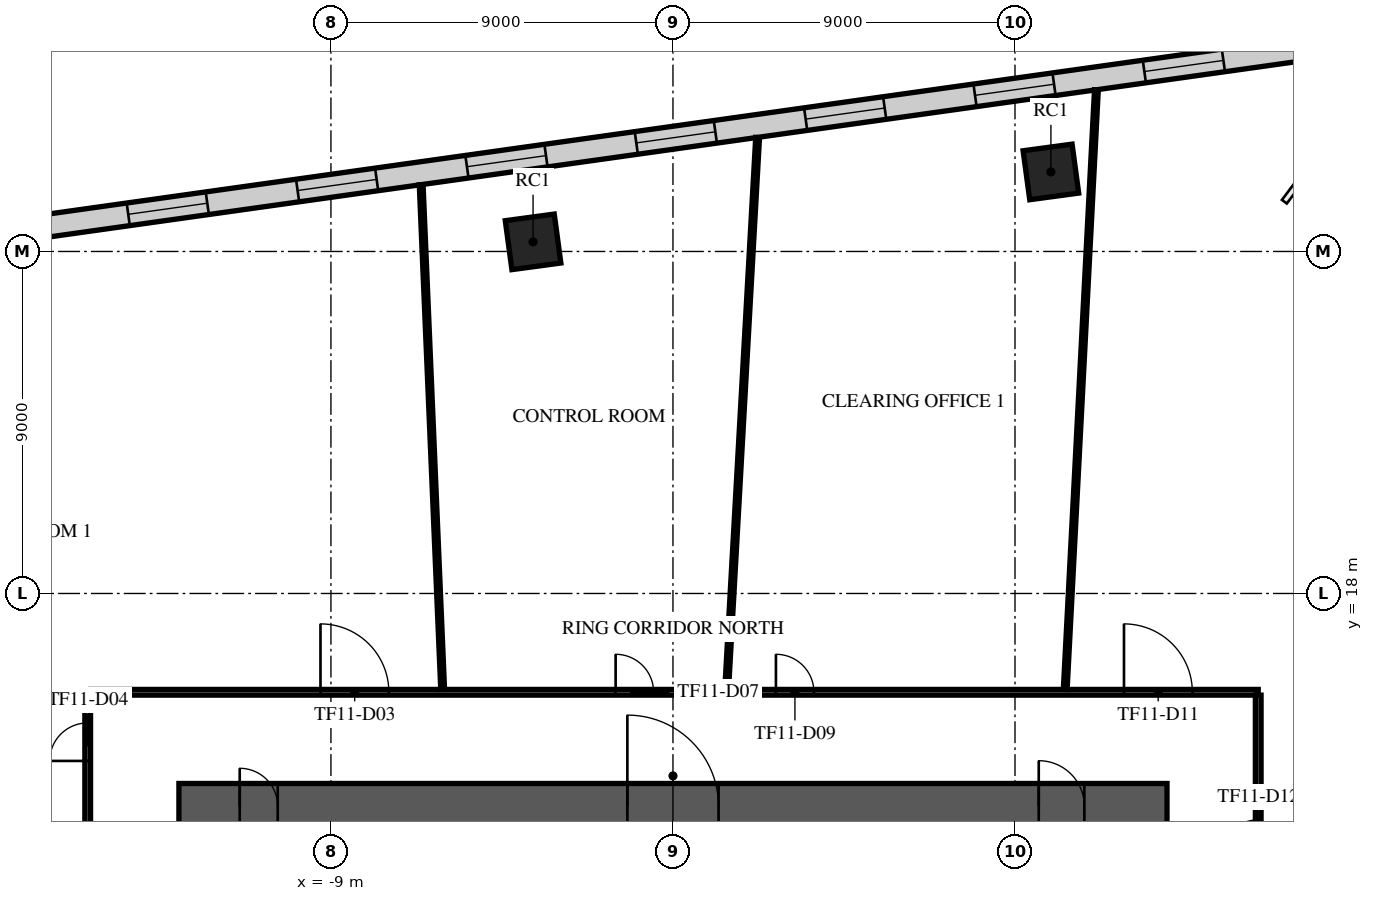
"""IFC4 building model, lengths in metres.
Left out: names, types, materials, properties, quantities, classifications, styles, units other than length and angle.
Written with IfcOpenShell. Run it as: python <this file> out.ifc"""

import sys

from ifc_helpers import new_model, si_unit, direction, frame, frame_2d, origin, origin_2d, place, context, subcontext, project, spatial, rectangle, extrude, element, fill, save


model = new_model("IFC4")
c1 = context("Model", 3, precision=1e-05, world=origin(), true_north=direction((0.0, 1.0)))
c2 = subcontext(c1, "Body", "Model", "MODEL_VIEW")
j1 = project(units=[si_unit("LENGTHUNIT", "METRE"), si_unit("PLANEANGLEUNIT", "RADIAN")], contexts=[c1])
p1 = place(None, origin())
s1 = spatial("IfcSite", under=j1, at=p1, CompositionType="ELEMENT")
p2 = place(p1, origin())
s2 = spatial("IfcBuilding", under=s1, at=p2, CompositionType="ELEMENT")
p3 = place(p2, frame((0.0, 0.0, 51.3)))
s3 = spatial("IfcBuildingStorey", under=s2, at=p3, CompositionType="ELEMENT", Elevation=51.3)
for number, where, z_axis, x_axis in (
    (1, (9.945, 29.093, 0.0), (0.0, 0.0, 1.0), (0.991, 0.134, 0.0)),
    (2, (-3.681, 27.253, 0.0), (0.0, 0.0, 1.0), (0.991, 0.134, 0.0)),
):
    element("IfcColumn", number, at=place(p3, frame(where, z_axis=z_axis, x_axis=x_axis)), inside=s3, PredefinedType="COLUMN", context=c2, shape_type="SweptSolid", body=[
        extrude(rectangle(XDim=1.3, YDim=1.3, at=origin_2d()), origin(), (0.0, 0.0, 1.0), 4.2),
    ])
p4 = place(p3, frame((-13.0, 12.4, 0.0), z_axis=(0.0, 0.0, 1.0), x_axis=(1.0, 0.0, 0.0)))
e3 = element("IfcWall", 3, at=p4, inside=s3, PredefinedType="SHEAR", context=c2, shape_type="SweptSolid", body=[
    extrude(rectangle(XDim=26.0, YDim=1.2, at=frame_2d((13.0, 0.0))), origin(), (0.0, 0.0, 1.0), 3.75),
])
p5 = place(p4, frame((11.8, 0.0, 0.0)))
e4 = element("IfcOpeningElement", 4, at=p5, cuts=e3, PredefinedType="OPENING", context=c2, shape_type="SweptSolid", body=[
    extrude(rectangle(XDim=2.4, YDim=2.4, at=frame_2d((1.2, 1.2))), frame((0.0, 0.61, 0.0), z_axis=(0.0, -1.0, 0.0), x_axis=(1.0, 0.0, 0.0)), (0.0, 0.0, 1.0), 1.22),
])
p6 = place(p4, frame((22.625, 0.0, 0.0)))
e5 = element("IfcOpeningElement", 5, at=p6, cuts=e3, PredefinedType="OPENING", context=c2, shape_type="SweptSolid", body=[
    extrude(rectangle(XDim=1.2, YDim=2.1, at=frame_2d((0.6, 1.05))), frame((0.0, 0.61, 0.0), z_axis=(0.0, -1.0, 0.0), x_axis=(1.0, 0.0, 0.0)), (0.0, 0.0, 1.0), 1.22),
])
p7 = place(p4, frame((1.6, 0.0, 0.0)))
e6 = element("IfcOpeningElement", 6, at=p7, cuts=e3, PredefinedType="OPENING", context=c2, shape_type="SweptSolid", body=[
    extrude(rectangle(XDim=1.0, YDim=2.1, at=frame_2d((0.5, 1.05))), frame((0.0, 0.61, 0.0), z_axis=(0.0, -1.0, 0.0), x_axis=(1.0, 0.0, 0.0)), (0.0, 0.0, 1.0), 1.22),
])
p8 = place(p3, frame((20.128, 32.821, 0.0), z_axis=(0.0, 0.0, 1.0), x_axis=(-0.990267943129, -0.139173994734, 0.0)))
e7 = element("IfcWall", 7, at=p8, inside=s3, PredefinedType="STANDARD", context=c2, shape_type="SweptSolid", body=[
    extrude(rectangle(XDim=49.376, YDim=0.6, at=frame_2d((24.688, 0.0))), origin(), (0.0, 0.0, 1.0), 3.75),
])
p9 = place(p8, frame((1.2, 0.0, 0.9)))
e8 = element("IfcOpeningElement", 8, at=p9, cuts=e7, PredefinedType="OPENING", context=c2, shape_type="SweptSolid", body=[
    extrude(rectangle(XDim=2.1, YDim=2.1, at=frame_2d((1.05, 1.05))), frame((0.0, 0.31, 0.0), z_axis=(0.0, -1.0, 0.0), x_axis=(1.0, 0.0, 0.0)), (0.0, 0.0, 1.0), 0.62),
])
p10 = place(p8, frame((5.7, 0.0, 0.9)))
e9 = element("IfcOpeningElement", 9, at=p10, cuts=e7, PredefinedType="OPENING", context=c2, shape_type="SweptSolid", body=[
    extrude(rectangle(XDim=2.1, YDim=2.1, at=frame_2d((1.05, 1.05))), frame((0.0, 0.31, 0.0), z_axis=(0.0, -1.0, 0.0), x_axis=(1.0, 0.0, 0.0)), (0.0, 0.0, 1.0), 0.62),
])
p11 = place(p8, frame((10.2, 0.0, 0.9)))
e10 = element("IfcOpeningElement", 10, at=p11, cuts=e7, PredefinedType="OPENING", context=c2, shape_type="SweptSolid", body=[
    extrude(rectangle(XDim=2.1, YDim=2.1, at=frame_2d((1.05, 1.05))), frame((0.0, 0.31, 0.0), z_axis=(0.0, -1.0, 0.0), x_axis=(1.0, 0.0, 0.0)), (0.0, 0.0, 1.0), 0.62),
])
p12 = place(p8, frame((14.7, 0.0, 0.9)))
e11 = element("IfcOpeningElement", 11, at=p12, cuts=e7, PredefinedType="OPENING", context=c2, shape_type="SweptSolid", body=[
    extrude(rectangle(XDim=2.1, YDim=2.1, at=frame_2d((1.05, 1.05))), frame((0.0, 0.31, 0.0), z_axis=(0.0, -1.0, 0.0), x_axis=(1.0, 0.0, 0.0)), (0.0, 0.0, 1.0), 0.62),
])
p13 = place(p8, frame((19.2, 0.0, 0.9)))
e12 = element("IfcOpeningElement", 12, at=p13, cuts=e7, PredefinedType="OPENING", context=c2, shape_type="SweptSolid", body=[
    extrude(rectangle(XDim=2.1, YDim=2.1, at=frame_2d((1.05, 1.05))), frame((0.0, 0.31, 0.0), z_axis=(0.0, -1.0, 0.0), x_axis=(1.0, 0.0, 0.0)), (0.0, 0.0, 1.0), 0.62),
])
p14 = place(p8, frame((23.7, 0.0, 0.9)))
e13 = element("IfcOpeningElement", 13, at=p14, cuts=e7, PredefinedType="OPENING", context=c2, shape_type="SweptSolid", body=[
    extrude(rectangle(XDim=2.1, YDim=2.1, at=frame_2d((1.05, 1.05))), frame((0.0, 0.31, 0.0), z_axis=(0.0, -1.0, 0.0), x_axis=(1.0, 0.0, 0.0)), (0.0, 0.0, 1.0), 0.62),
])
p15 = place(p8, frame((28.2, 0.0, 0.9)))
e14 = element("IfcOpeningElement", 14, at=p15, cuts=e7, PredefinedType="OPENING", context=c2, shape_type="SweptSolid", body=[
    extrude(rectangle(XDim=2.1, YDim=2.1, at=frame_2d((1.05, 1.05))), frame((0.0, 0.31, 0.0), z_axis=(0.0, -1.0, 0.0), x_axis=(1.0, 0.0, 0.0)), (0.0, 0.0, 1.0), 0.62),
])
p16 = place(p8, frame((32.7, 0.0, 0.9)))
e15 = element("IfcOpeningElement", 15, at=p16, cuts=e7, PredefinedType="OPENING", context=c2, shape_type="SweptSolid", body=[
    extrude(rectangle(XDim=2.1, YDim=2.1, at=frame_2d((1.05, 1.05))), frame((0.0, 0.31, 0.0), z_axis=(0.0, -1.0, 0.0), x_axis=(1.0, 0.0, 0.0)), (0.0, 0.0, 1.0), 0.62),
])
p17 = place(p8, frame((37.2, 0.0, 0.9)))
e16 = element("IfcOpeningElement", 16, at=p17, cuts=e7, PredefinedType="OPENING", context=c2, shape_type="SweptSolid", body=[
    extrude(rectangle(XDim=2.1, YDim=2.1, at=frame_2d((1.05, 1.05))), frame((0.0, 0.31, 0.0), z_axis=(0.0, -1.0, 0.0), x_axis=(1.0, 0.0, 0.0)), (0.0, 0.0, 1.0), 0.62),
])
p18 = place(p8, frame((41.7, 0.0, 0.9)))
e17 = element("IfcOpeningElement", 17, at=p18, cuts=e7, PredefinedType="OPENING", context=c2, shape_type="SweptSolid", body=[
    extrude(rectangle(XDim=2.1, YDim=2.1, at=frame_2d((1.05, 1.05))), frame((0.0, 0.31, 0.0), z_axis=(0.0, -1.0, 0.0), x_axis=(1.0, 0.0, 0.0)), (0.0, 0.0, 1.0), 0.62),
])
p19 = place(p8, frame((46.138, 0.0, 0.9)))
e18 = element("IfcOpeningElement", 18, at=p19, cuts=e7, PredefinedType="OPENING", context=c2, shape_type="SweptSolid", body=[
    extrude(rectangle(XDim=2.1, YDim=2.1, at=frame_2d((1.05, 1.05))), frame((0.0, 0.31, 0.0), z_axis=(0.0, -1.0, 0.0), x_axis=(1.0, 0.0, 0.0)), (0.0, 0.0, 1.0), 0.62),
])
p20 = place(p3, frame((-15.4, -15.4, 0.0), z_axis=(0.0, 0.0, 1.0), x_axis=(0.0, 1.0, 0.0)))
e19 = element("IfcWall", 19, at=p20, inside=s3, PredefinedType="PARTITIONING", context=c2, shape_type="SweptSolid", body=[
    extrude(rectangle(XDim=30.8, YDim=0.15, at=frame_2d((15.4, 0.0))), origin(), (0.0, 0.0, 1.0), 3.25),
])
p21 = place(p20, frame((23.272, 0.0, 0.0)))
e20 = element("IfcOpeningElement", 20, at=p21, cuts=e19, PredefinedType="OPENING", context=c2, shape_type="SweptSolid", body=[
    extrude(rectangle(XDim=1.0, YDim=2.1, at=frame_2d((0.5, 1.05))), frame((0.0, 0.085, 0.0), z_axis=(0.0, -1.0, 0.0), x_axis=(1.0, 0.0, 0.0)), (0.0, 0.0, 1.0), 0.17),
])
p22 = place(p20, frame((9.982, 0.0, 0.0)))
e21 = element("IfcOpeningElement", 21, at=p22, cuts=e19, PredefinedType="OPENING", context=c2, shape_type="SweptSolid", body=[
    extrude(rectangle(XDim=1.0, YDim=2.1, at=frame_2d((0.5, 1.05))), frame((0.0, 0.085, 0.0), z_axis=(0.0, -1.0, 0.0), x_axis=(1.0, 0.0, 0.0)), (0.0, 0.0, 1.0), 0.17),
])
p23 = place(p20, frame((28.993, 0.0, 0.0)))
e22 = element("IfcOpeningElement", 22, at=p23, cuts=e19, PredefinedType="OPENING", context=c2, shape_type="SweptSolid", body=[
    extrude(rectangle(XDim=1.0, YDim=2.1, at=frame_2d((0.5, 1.05))), frame((0.0, 0.085, 0.0), z_axis=(0.0, -1.0, 0.0), x_axis=(1.0, 0.0, 0.0)), (0.0, 0.0, 1.0), 0.17),
])
p24 = place(p20, frame((0.3, 0.0, 0.0)))
e23 = element("IfcOpeningElement", 23, at=p24, cuts=e19, PredefinedType="OPENING", context=c2, shape_type="SweptSolid", body=[
    extrude(rectangle(XDim=1.8, YDim=2.1, at=frame_2d((0.9, 1.05))), frame((0.0, 0.085, 0.0), z_axis=(0.0, -1.0, 0.0), x_axis=(1.0, 0.0, 0.0)), (0.0, 0.0, 1.0), 0.17),
])
p25 = place(p3, frame((-15.325, 15.4, 0.0), z_axis=(0.0, 0.0, 1.0), x_axis=(1.0, 0.0, 0.0)))
e24 = element("IfcWall", 24, at=p25, inside=s3, PredefinedType="PARTITIONING", context=c2, shape_type="SweptSolid", body=[
    extrude(rectangle(XDim=30.725, YDim=0.15, at=frame_2d((15.362, 0.0))), origin(), (0.0, 0.0, 1.0), 3.25),
])
p26 = place(p25, frame((6.05, 0.0, 0.0)))
e25 = element("IfcOpeningElement", 25, at=p26, cuts=e24, PredefinedType="OPENING", context=c2, shape_type="SweptSolid", body=[
    extrude(rectangle(XDim=1.8, YDim=2.1, at=frame_2d((0.9, 1.05))), frame((0.0, 0.085, 0.0), z_axis=(0.0, -1.0, 0.0), x_axis=(1.0, 0.0, 0.0)), (0.0, 0.0, 1.0), 0.17),
])
p27 = place(p25, frame((13.816, 0.0, 0.0)))
e26 = element("IfcOpeningElement", 26, at=p27, cuts=e24, PredefinedType="OPENING", context=c2, shape_type="SweptSolid", body=[
    extrude(rectangle(XDim=1.0, YDim=2.1, at=frame_2d((0.5, 1.05))), frame((0.0, 0.085, 0.0), z_axis=(0.0, -1.0, 0.0), x_axis=(1.0, 0.0, 0.0)), (0.0, 0.0, 1.0), 0.17),
])
p28 = place(p25, frame((18.034, 0.0, 0.0)))
e27 = element("IfcOpeningElement", 27, at=p28, cuts=e24, PredefinedType="OPENING", context=c2, shape_type="SweptSolid", body=[
    extrude(rectangle(XDim=1.0, YDim=2.1, at=frame_2d((0.5, 1.05))), frame((0.0, 0.085, 0.0), z_axis=(0.0, -1.0, 0.0), x_axis=(1.0, 0.0, 0.0)), (0.0, 0.0, 1.0), 0.17),
])
p29 = place(p25, frame((27.193, 0.0, 0.0)))
e28 = element("IfcOpeningElement", 28, at=p29, cuts=e24, PredefinedType="OPENING", context=c2, shape_type="SweptSolid", body=[
    extrude(rectangle(XDim=1.8, YDim=2.1, at=frame_2d((0.9, 1.05))), frame((0.0, 0.085, 0.0), z_axis=(0.0, -1.0, 0.0), x_axis=(1.0, 0.0, 0.0)), (0.0, 0.0, 1.0), 0.17),
])
p30 = place(p3, frame((15.4, -15.325, 0.0), z_axis=(0.0, 0.0, 1.0), x_axis=(0.0, 1.0, 0.0)))
e29 = element("IfcWall", 29, at=p30, inside=s3, PredefinedType="PARTITIONING", context=c2, shape_type="SweptSolid", body=[
    extrude(rectangle(XDim=30.65, YDim=0.15, at=frame_2d((15.325, 0.0))), origin(), (0.0, 0.0, 1.0), 3.25),
])
p31 = place(p30, frame((26.368, 0.0, 0.0)))
e30 = element("IfcOpeningElement", 30, at=p31, cuts=e29, PredefinedType="OPENING", context=c2, shape_type="SweptSolid", body=[
    extrude(rectangle(XDim=1.0, YDim=2.1, at=frame_2d((0.5, 1.05))), frame((0.0, 0.085, 0.0), z_axis=(0.0, -1.0, 0.0), x_axis=(1.0, 0.0, 0.0)), (0.0, 0.0, 1.0), 0.17),
])
p32 = place(p30, frame((6.3, 0.0, 0.0)))
e31 = element("IfcOpeningElement", 31, at=p32, cuts=e29, PredefinedType="OPENING", context=c2, shape_type="SweptSolid", body=[
    extrude(rectangle(XDim=1.8, YDim=2.1, at=frame_2d((0.9, 1.05))), frame((0.0, 0.085, 0.0), z_axis=(0.0, -1.0, 0.0), x_axis=(1.0, 0.0, 0.0)), (0.0, 0.0, 1.0), 0.17),
])
p33 = place(p30, frame((0.3, 0.0, 0.0)))
e32 = element("IfcOpeningElement", 32, at=p33, cuts=e29, PredefinedType="OPENING", context=c2, shape_type="SweptSolid", body=[
    extrude(rectangle(XDim=1.0, YDim=2.1, at=frame_2d((0.5, 1.05))), frame((0.0, 0.085, 0.0), z_axis=(0.0, -1.0, 0.0), x_axis=(1.0, 0.0, 0.0)), (0.0, 0.0, 1.0), 0.17),
])
p34 = place(p30, frame((13.806, 0.0, 0.0)))
e33 = element("IfcOpeningElement", 33, at=p34, cuts=e29, PredefinedType="OPENING", context=c2, shape_type="SweptSolid", body=[
    extrude(rectangle(XDim=1.8, YDim=2.1, at=frame_2d((0.9, 1.05))), frame((0.0, 0.085, 0.0), z_axis=(0.0, -1.0, 0.0), x_axis=(1.0, 0.0, 0.0)), (0.0, 0.0, 1.0), 0.17),
])
p35 = place(p30, frame((18.556, 0.0, 0.0)))
e34 = element("IfcOpeningElement", 34, at=p35, cuts=e29, PredefinedType="OPENING", context=c2, shape_type="SweptSolid", body=[
    extrude(rectangle(XDim=1.0, YDim=2.1, at=frame_2d((0.5, 1.05))), frame((0.0, 0.085, 0.0), z_axis=(0.0, -1.0, 0.0), x_axis=(1.0, 0.0, 0.0)), (0.0, 0.0, 1.0), 0.17),
])
p36 = place(p3, frame((-6.625, 28.756, 0.0), z_axis=(0.0, 0.0, 1.0), x_axis=(0.042506133855, -0.99909620587, 0.0)))
e35 = element("IfcWall", 35, at=p36, inside=s3, PredefinedType="PARTITIONING", context=c2, shape_type="SweptSolid", body=[
    extrude(rectangle(XDim=13.291, YDim=0.1, at=frame_2d((6.646, 0.0))), origin(), (0.0, 0.0, 1.0), 2.95),
])
p37 = place(p3, frame((1.413, 15.478, 0.0), z_axis=(0.0, 0.0, 1.0), x_axis=(0.05597852546, 0.998431972989, 0.0)))
e36 = element("IfcWall", 36, at=p37, inside=s3, PredefinedType="PARTITIONING", context=c2, shape_type="SweptSolid", body=[
    extrude(rectangle(XDim=14.545, YDim=0.1, at=frame_2d((7.272, 0.0))), origin(), (0.0, 0.0, 1.0), 2.95),
])
p38 = place(p3, frame((10.322, 15.478, 0.0), z_axis=(0.0, 0.0, 1.0), x_axis=(0.05191473279, 0.998651521062, 0.0)))
e37 = element("IfcWall", 37, at=p38, inside=s3, PredefinedType="PARTITIONING", context=c2, shape_type="SweptSolid", body=[
    extrude(rectangle(XDim=15.796, YDim=0.1, at=frame_2d((7.898, 0.0))), origin(), (0.0, 0.0, 1.0), 2.95),
])
p39 = place(p5, origin())
e38 = element("IfcDoor", 38, at=p39, inside=s3, OperationType="SINGLE_SWING_LEFT", PredefinedType="DOOR", context=c2, shape_type="SweptSolid", body=[
    extrude(rectangle(XDim=2.4, YDim=2.4, at=frame_2d((1.2, 1.2))), frame((0.0, 0.025, 0.0), z_axis=(0.0, -1.0, 0.0), x_axis=(1.0, 0.0, 0.0)), (0.0, 0.0, 1.0), 0.05),
])
fill(e4, e38)
p40 = place(p6, origin())
e39 = element("IfcDoor", 39, at=p40, inside=s3, OperationType="SINGLE_SWING_LEFT", PredefinedType="DOOR", context=c2, shape_type="SweptSolid", body=[
    extrude(rectangle(XDim=1.2, YDim=2.1, at=frame_2d((0.6, 1.05))), frame((0.0, 0.025, 0.0), z_axis=(0.0, -1.0, 0.0), x_axis=(1.0, 0.0, 0.0)), (0.0, 0.0, 1.0), 0.05),
])
fill(e5, e39)
p41 = place(p7, origin())
e40 = element("IfcDoor", 40, at=p41, inside=s3, OperationType="SINGLE_SWING_LEFT", PredefinedType="DOOR", context=c2, shape_type="SweptSolid", body=[
    extrude(rectangle(XDim=1.0, YDim=2.1, at=frame_2d((0.5, 1.05))), frame((0.0, 0.025, 0.0), z_axis=(0.0, -1.0, 0.0), x_axis=(1.0, 0.0, 0.0)), (0.0, 0.0, 1.0), 0.05),
])
fill(e6, e40)
p42 = place(p10, origin())
e41 = element("IfcWindow", 41, at=p42, inside=s3, PartitioningType="SINGLE_PANEL", PredefinedType="WINDOW", context=c2, shape_type="SweptSolid", body=[
    extrude(rectangle(XDim=2.1, YDim=2.1, at=frame_2d((1.05, 1.05))), frame((0.0, 0.03, 0.0), z_axis=(0.0, -1.0, 0.0), x_axis=(1.0, 0.0, 0.0)), (0.0, 0.0, 1.0), 0.06),
])
fill(e9, e41)
p43 = place(p11, origin())
e42 = element("IfcWindow", 42, at=p43, inside=s3, PartitioningType="SINGLE_PANEL", PredefinedType="WINDOW", context=c2, shape_type="SweptSolid", body=[
    extrude(rectangle(XDim=2.1, YDim=2.1, at=frame_2d((1.05, 1.05))), frame((0.0, 0.03, 0.0), z_axis=(0.0, -1.0, 0.0), x_axis=(1.0, 0.0, 0.0)), (0.0, 0.0, 1.0), 0.06),
])
fill(e10, e42)
p44 = place(p12, origin())
e43 = element("IfcWindow", 43, at=p44, inside=s3, PartitioningType="SINGLE_PANEL", PredefinedType="WINDOW", context=c2, shape_type="SweptSolid", body=[
    extrude(rectangle(XDim=2.1, YDim=2.1, at=frame_2d((1.05, 1.05))), frame((0.0, 0.03, 0.0), z_axis=(0.0, -1.0, 0.0), x_axis=(1.0, 0.0, 0.0)), (0.0, 0.0, 1.0), 0.06),
])
fill(e11, e43)
p45 = place(p13, origin())
e44 = element("IfcWindow", 44, at=p45, inside=s3, PartitioningType="SINGLE_PANEL", PredefinedType="WINDOW", context=c2, shape_type="SweptSolid", body=[
    extrude(rectangle(XDim=2.1, YDim=2.1, at=frame_2d((1.05, 1.05))), frame((0.0, 0.03, 0.0), z_axis=(0.0, -1.0, 0.0), x_axis=(1.0, 0.0, 0.0)), (0.0, 0.0, 1.0), 0.06),
])
fill(e12, e44)
p46 = place(p14, origin())
e45 = element("IfcWindow", 45, at=p46, inside=s3, PartitioningType="SINGLE_PANEL", PredefinedType="WINDOW", context=c2, shape_type="SweptSolid", body=[
    extrude(rectangle(XDim=2.1, YDim=2.1, at=frame_2d((1.05, 1.05))), frame((0.0, 0.03, 0.0), z_axis=(0.0, -1.0, 0.0), x_axis=(1.0, 0.0, 0.0)), (0.0, 0.0, 1.0), 0.06),
])
fill(e13, e45)
p47 = place(p15, origin())
e46 = element("IfcWindow", 46, at=p47, inside=s3, PartitioningType="SINGLE_PANEL", PredefinedType="WINDOW", context=c2, shape_type="SweptSolid", body=[
    extrude(rectangle(XDim=2.1, YDim=2.1, at=frame_2d((1.05, 1.05))), frame((0.0, 0.03, 0.0), z_axis=(0.0, -1.0, 0.0), x_axis=(1.0, 0.0, 0.0)), (0.0, 0.0, 1.0), 0.06),
])
fill(e14, e46)
p48 = place(p16, origin())
e47 = element("IfcWindow", 47, at=p48, inside=s3, PartitioningType="SINGLE_PANEL", PredefinedType="WINDOW", context=c2, shape_type="SweptSolid", body=[
    extrude(rectangle(XDim=2.1, YDim=2.1, at=frame_2d((1.05, 1.05))), frame((0.0, 0.03, 0.0), z_axis=(0.0, -1.0, 0.0), x_axis=(1.0, 0.0, 0.0)), (0.0, 0.0, 1.0), 0.06),
])
fill(e15, e47)
p49 = place(p26, origin())
e48 = element("IfcDoor", 48, at=p49, inside=s3, OperationType="DOUBLE_DOOR_SINGLE_SWING", PredefinedType="DOOR", context=c2, shape_type="SweptSolid", body=[
    extrude(rectangle(XDim=1.8, YDim=2.1, at=frame_2d((0.9, 1.05))), frame((0.0, 0.025, 0.0), z_axis=(0.0, -1.0, 0.0), x_axis=(1.0, 0.0, 0.0)), (0.0, 0.0, 1.0), 0.05),
])
fill(e25, e48)
p50 = place(p23, origin())
e49 = element("IfcDoor", 49, at=p50, inside=s3, OperationType="SINGLE_SWING_LEFT", PredefinedType="DOOR", context=c2, shape_type="SweptSolid", body=[
    extrude(rectangle(XDim=1.0, YDim=2.1, at=frame_2d((0.5, 1.05))), frame((0.0, 0.025, 0.0), z_axis=(0.0, -1.0, 0.0), x_axis=(1.0, 0.0, 0.0)), (0.0, 0.0, 1.0), 0.05),
])
fill(e22, e49)
p51 = place(p27, origin())
e50 = element("IfcDoor", 50, at=p51, inside=s3, OperationType="SINGLE_SWING_RIGHT", PredefinedType="DOOR", context=c2, shape_type="SweptSolid", body=[
    extrude(rectangle(XDim=1.0, YDim=2.1, at=frame_2d((0.5, 1.05))), frame((0.0, 0.025, 0.0), z_axis=(0.0, -1.0, 0.0), x_axis=(1.0, 0.0, 0.0)), (0.0, 0.0, 1.0), 0.05),
])
fill(e26, e50)
p52 = place(p28, origin())
e51 = element("IfcDoor", 51, at=p52, inside=s3, OperationType="SINGLE_SWING_LEFT", PredefinedType="DOOR", context=c2, shape_type="SweptSolid", body=[
    extrude(rectangle(XDim=1.0, YDim=2.1, at=frame_2d((0.5, 1.05))), frame((0.0, 0.025, 0.0), z_axis=(0.0, -1.0, 0.0), x_axis=(1.0, 0.0, 0.0)), (0.0, 0.0, 1.0), 0.05),
])
fill(e27, e51)
p53 = place(p29, origin())
e52 = element("IfcDoor", 52, at=p53, inside=s3, OperationType="DOUBLE_DOOR_SINGLE_SWING", PredefinedType="DOOR", context=c2, shape_type="SweptSolid", body=[
    extrude(rectangle(XDim=1.8, YDim=2.1, at=frame_2d((0.9, 1.05))), frame((0.0, 0.025, 0.0), z_axis=(0.0, -1.0, 0.0), x_axis=(1.0, 0.0, 0.0)), (0.0, 0.0, 1.0), 0.05),
])
fill(e28, e52)
p54 = place(p31, frame((1.0, 0.0, 0.0), z_axis=(0.0, 0.0, 1.0), x_axis=(-1.0, 0.0, 0.0)))
e53 = element("IfcDoor", 53, at=p54, inside=s3, OperationType="SINGLE_SWING_LEFT", PredefinedType="DOOR", context=c2, shape_type="SweptSolid", body=[
    extrude(rectangle(XDim=1.0, YDim=2.1, at=frame_2d((0.5, 1.05))), frame((0.0, 0.025, 0.0), z_axis=(0.0, -1.0, 0.0), x_axis=(1.0, 0.0, 0.0)), (0.0, 0.0, 1.0), 0.05),
])
fill(e30, e53)
save(model, sys.argv[1])
